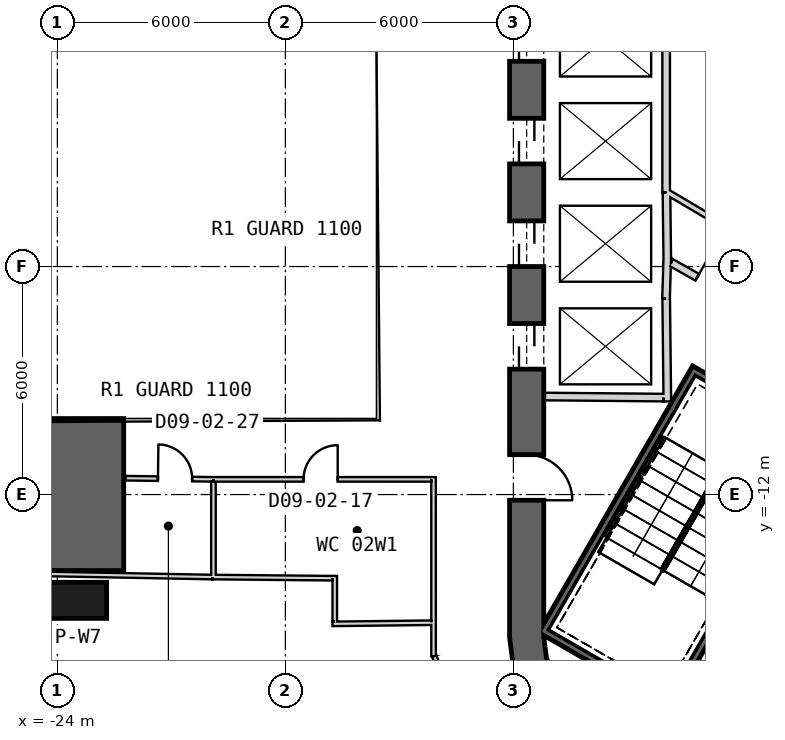
"""IFC4 building model, lengths in metres.
Left out: names, types, materials, properties, quantities, classifications, styles, units other than length and angle.
Written with IfcOpenShell. Run it as: python <this file> out.ifc"""

import sys

from ifc_helpers import new_model, si_unit, direction, frame, frame_2d, origin, origin_2d, place, context, subcontext, project, spatial, polyline, rectangle, outline, extrude, element, fill, save


model = new_model("IFC4")
c1 = context("Model", 3, precision=1e-05, world=origin(), true_north=direction((0.0, 1.0)))
c2 = subcontext(c1, "Body", "Model", "MODEL_VIEW")
j1 = project(units=[si_unit("LENGTHUNIT", "METRE"), si_unit("PLANEANGLEUNIT", "RADIAN")], contexts=[c1])
p1 = place(None, origin())
s1 = spatial("IfcSite", under=j1, at=p1, CompositionType="ELEMENT")
p2 = place(p1, origin())
s2 = spatial("IfcBuilding", under=s1, at=p2, CompositionType="ELEMENT")
p3 = place(p2, frame((0.0, 0.0, 15.5)))
s3 = spatial("IfcBuildingStorey", under=s2, at=p3, CompositionType="ELEMENT", Elevation=15.5)
p4 = place(p3, frame((-23.453, -14.783, 0.0), z_axis=(0.0, 0.0, 1.0), x_axis=(-1.0, 0.0, 0.0)))
e1 = element("IfcColumn", 1, at=p4, inside=s3, PredefinedType="COLUMN", context=c2, shape_type="SweptSolid", body=[
    extrude(rectangle(XDim=1.5, YDim=0.95, at=origin_2d()), origin(), (0.0, 0.0, 1.0), 6.0),
])
p5 = place(p3, frame((-11.65, 15.762, 0.0), z_axis=(0.0, 0.0, 1.0), x_axis=(0.0, -1.0, 0.0)))
e2 = element("IfcWall", 2, at=p5, inside=s3, PredefinedType="SHEAR", context=c2, shape_type="SweptSolid", body=[
    extrude(rectangle(XDim=31.523, YDim=0.9, at=frame_2d((15.762, 0.0))), origin(), (0.0, 0.0, 1.0), 6.0),
])
p6 = place(p5, frame((7.062, 0.0, 0.0)))
e3 = element("IfcOpeningElement", 3, at=p6, cuts=e2, PredefinedType="OPENING", context=c2, shape_type="SweptSolid", body=[
    extrude(rectangle(XDim=1.2, YDim=2.4, at=frame_2d((0.6, 1.2))), frame((0.0, 0.46, 0.0), z_axis=(0.0, -1.0, 0.0), x_axis=(1.0, 0.0, 0.0)), (0.0, 0.0, 1.0), 0.92),
])
p7 = place(p5, frame((9.762, 0.0, 0.0)))
e4 = element("IfcOpeningElement", 4, at=p7, cuts=e2, PredefinedType="OPENING", context=c2, shape_type="SweptSolid", body=[
    extrude(rectangle(XDim=1.2, YDim=2.4, at=frame_2d((0.6, 1.2))), frame((0.0, 0.46, 0.0), z_axis=(0.0, -1.0, 0.0), x_axis=(1.0, 0.0, 0.0)), (0.0, 0.0, 1.0), 0.92),
])
p8 = place(p5, frame((12.462, 0.0, 0.0)))
e5 = element("IfcOpeningElement", 5, at=p8, cuts=e2, PredefinedType="OPENING", context=c2, shape_type="SweptSolid", body=[
    extrude(rectangle(XDim=1.2, YDim=2.4, at=frame_2d((0.6, 1.2))), frame((0.0, 0.46, 0.0), z_axis=(0.0, -1.0, 0.0), x_axis=(1.0, 0.0, 0.0)), (0.0, 0.0, 1.0), 0.92),
])
p9 = place(p5, frame((15.162, 0.0, 0.0)))
e6 = element("IfcOpeningElement", 6, at=p9, cuts=e2, PredefinedType="OPENING", context=c2, shape_type="SweptSolid", body=[
    extrude(rectangle(XDim=1.2, YDim=2.4, at=frame_2d((0.6, 1.2))), frame((0.0, 0.46, 0.0), z_axis=(0.0, -1.0, 0.0), x_axis=(1.0, 0.0, 0.0)), (0.0, 0.0, 1.0), 0.92),
])
p10 = place(p5, frame((17.862, 0.0, 0.0)))
e7 = element("IfcOpeningElement", 7, at=p10, cuts=e2, PredefinedType="OPENING", context=c2, shape_type="SweptSolid", body=[
    extrude(rectangle(XDim=1.2, YDim=2.4, at=frame_2d((0.6, 1.2))), frame((0.0, 0.46, 0.0), z_axis=(0.0, -1.0, 0.0), x_axis=(1.0, 0.0, 0.0)), (0.0, 0.0, 1.0), 0.92),
])
p11 = place(p5, frame((20.562, 0.0, 0.0)))
e8 = element("IfcOpeningElement", 8, at=p11, cuts=e2, PredefinedType="OPENING", context=c2, shape_type="SweptSolid", body=[
    extrude(rectangle(XDim=1.2, YDim=2.4, at=frame_2d((0.6, 1.2))), frame((0.0, 0.46, 0.0), z_axis=(0.0, -1.0, 0.0), x_axis=(1.0, 0.0, 0.0)), (0.0, 0.0, 1.0), 0.92),
])
p12 = place(p5, frame((23.262, 0.0, 0.0)))
e9 = element("IfcOpeningElement", 9, at=p12, cuts=e2, PredefinedType="OPENING", context=c2, shape_type="SweptSolid", body=[
    extrude(rectangle(XDim=1.2, YDim=2.4, at=frame_2d((0.6, 1.2))), frame((0.0, 0.46, 0.0), z_axis=(0.0, -1.0, 0.0), x_axis=(1.0, 0.0, 0.0)), (0.0, 0.0, 1.0), 0.92),
])
p13 = place(p5, frame((3.612, 0.0, 0.0)))
e10 = element("IfcOpeningElement", 10, at=p13, cuts=e2, PredefinedType="OPENING", context=c2, shape_type="SweptSolid", body=[
    extrude(rectangle(XDim=1.2, YDim=2.4, at=frame_2d((0.6, 1.2))), frame((0.0, 0.46, 0.0), z_axis=(0.0, -1.0, 0.0), x_axis=(1.0, 0.0, 0.0)), (0.0, 0.0, 1.0), 0.92),
])
p14 = place(p5, frame((26.712, 0.0, 0.0)))
e11 = element("IfcOpeningElement", 11, at=p14, cuts=e2, PredefinedType="OPENING", context=c2, shape_type="SweptSolid", body=[
    extrude(rectangle(XDim=1.2, YDim=2.4, at=frame_2d((0.6, 1.2))), frame((0.0, 0.46, 0.0), z_axis=(0.0, -1.0, 0.0), x_axis=(1.0, 0.0, 0.0)), (0.0, 0.0, 1.0), 0.92),
])
p15 = place(p3, frame((-7.825, -17.97, 0.0), z_axis=(0.0, 0.0, 1.0), x_axis=(0.866028369851, 0.499994862586, 0.0)))
e12 = element("IfcWall", 12, at=p15, inside=s3, PredefinedType="SHEAR", context=c2, shape_type="SweptSolid", body=[
    extrude(rectangle(XDim=31.523, YDim=0.9, at=frame_2d((15.762, 0.0))), origin(), (0.0, 0.0, 1.0), 6.0),
])
p16 = place(p15, frame((7.062, 0.0, 0.0)))
e13 = element("IfcOpeningElement", 13, at=p16, cuts=e12, PredefinedType="OPENING", context=c2, shape_type="SweptSolid", body=[
    extrude(rectangle(XDim=1.2, YDim=2.4, at=frame_2d((0.6, 1.2))), frame((0.0, 0.46, 0.0), z_axis=(0.0, -1.0, 0.0), x_axis=(1.0, 0.0, 0.0)), (0.0, 0.0, 1.0), 0.92),
])
p17 = place(p15, frame((9.762, 0.0, 0.0)))
e14 = element("IfcOpeningElement", 14, at=p17, cuts=e12, PredefinedType="OPENING", context=c2, shape_type="SweptSolid", body=[
    extrude(rectangle(XDim=1.2, YDim=2.4, at=frame_2d((0.6, 1.2))), frame((0.0, 0.46, 0.0), z_axis=(0.0, -1.0, 0.0), x_axis=(1.0, 0.0, 0.0)), (0.0, 0.0, 1.0), 0.92),
])
p18 = place(p15, frame((12.462, 0.0, 0.0)))
e15 = element("IfcOpeningElement", 15, at=p18, cuts=e12, PredefinedType="OPENING", context=c2, shape_type="SweptSolid", body=[
    extrude(rectangle(XDim=1.2, YDim=2.4, at=frame_2d((0.6, 1.2))), frame((0.0, 0.46, 0.0), z_axis=(0.0, -1.0, 0.0), x_axis=(1.0, 0.0, 0.0)), (0.0, 0.0, 1.0), 0.92),
])
p19 = place(p15, frame((15.162, 0.0, 0.0)))
e16 = element("IfcOpeningElement", 16, at=p19, cuts=e12, PredefinedType="OPENING", context=c2, shape_type="SweptSolid", body=[
    extrude(rectangle(XDim=1.2, YDim=2.4, at=frame_2d((0.6, 1.2))), frame((0.0, 0.46, 0.0), z_axis=(0.0, -1.0, 0.0), x_axis=(1.0, 0.0, 0.0)), (0.0, 0.0, 1.0), 0.92),
])
p20 = place(p15, frame((17.862, 0.0, 0.0)))
e17 = element("IfcOpeningElement", 17, at=p20, cuts=e12, PredefinedType="OPENING", context=c2, shape_type="SweptSolid", body=[
    extrude(rectangle(XDim=1.2, YDim=2.4, at=frame_2d((0.6, 1.2))), frame((0.0, 0.46, 0.0), z_axis=(0.0, -1.0, 0.0), x_axis=(1.0, 0.0, 0.0)), (0.0, 0.0, 1.0), 0.92),
])
p21 = place(p15, frame((20.562, 0.0, 0.0)))
e18 = element("IfcOpeningElement", 18, at=p21, cuts=e12, PredefinedType="OPENING", context=c2, shape_type="SweptSolid", body=[
    extrude(rectangle(XDim=1.2, YDim=2.4, at=frame_2d((0.6, 1.2))), frame((0.0, 0.46, 0.0), z_axis=(0.0, -1.0, 0.0), x_axis=(1.0, 0.0, 0.0)), (0.0, 0.0, 1.0), 0.92),
])
p22 = place(p15, frame((26.712, 0.0, 0.0)))
e19 = element("IfcOpeningElement", 19, at=p22, cuts=e12, PredefinedType="OPENING", context=c2, shape_type="SweptSolid", body=[
    extrude(rectangle(XDim=1.2, YDim=2.4, at=frame_2d((0.6, 1.2))), frame((0.0, 0.46, 0.0), z_axis=(0.0, -1.0, 0.0), x_axis=(1.0, 0.0, 0.0)), (0.0, 0.0, 1.0), 0.92),
])
p23 = place(p15, frame((3.612, 0.0, 0.0)))
e20 = element("IfcOpeningElement", 20, at=p23, cuts=e12, PredefinedType="OPENING", context=c2, shape_type="SweptSolid", body=[
    extrude(rectangle(XDim=1.2, YDim=2.4, at=frame_2d((0.6, 1.2))), frame((0.0, 0.46, 0.0), z_axis=(0.0, -1.0, 0.0), x_axis=(1.0, 0.0, 0.0)), (0.0, 0.0, 1.0), 0.92),
])
p24 = place(p3, origin())
e21 = element("IfcWall", 21, at=p24, inside=s3, PredefinedType="SHEAR", context=c2, shape_type="SweptSolid", body=[
    extrude(outline(polyline([(-12.1, -15.762), (-11.998, -16.538), (-11.698, -17.262), (-11.221, -17.883), (-10.6, -18.36), (-9.876, -18.659), (-9.1, -18.762), (-8.323, -18.659), (-7.6, -18.36), (-8.05, -17.58), (-8.556, -17.79), (-9.1, -17.862), (-9.644, -17.79), (-10.15, -17.58), (-10.585, -17.247), (-10.919, -16.812), (-11.128, -16.305), (-11.2, -15.762), (-12.1, -15.762)])), origin(), (0.0, 0.0, 1.0), 6.0),
])
p25 = place(p3, origin())
e22 = element("IfcWall", 22, at=p25, inside=s3, PredefinedType="SHEAR", context=c2, shape_type="SweptSolid", body=[
    extrude(outline(polyline([(-25.553, -10.0), (-25.553, -14.0), (-22.253, -14.0), (-22.253, -10.0), (-25.553, -10.0)])), origin(), (0.0, 0.0, 1.0), 6.0),
])
p26 = place(p3, frame((-7.98, 4.05, 0.0), z_axis=(0.0, 0.0, 1.0), x_axis=(0.0, -1.0, 0.0)))
e23 = element("IfcWall", 23, at=p26, inside=s3, PredefinedType="PLUMBINGWALL", context=c2, shape_type="SweptSolid", body=[
    extrude(rectangle(XDim=8.1, YDim=0.2, at=frame_2d((4.05, 0.0))), origin(), (0.0, 0.0, 1.0), 5.7),
])
p27 = place(p3, frame((-7.95, -5.772, 0.0), z_axis=(0.0, 0.0, 1.0), x_axis=(-0.030803413295, -0.999525462272, 0.0)))
e24 = element("IfcWall", 24, at=p27, inside=s3, PredefinedType="PLUMBINGWALL", context=c2, shape_type="SweptSolid", body=[
    extrude(rectangle(XDim=1.078, YDim=0.2, at=frame_2d((0.539, 0.0))), origin(), (0.0, 0.0, 1.0), 5.7),
])
p28 = place(p3, frame((-7.971, -4.05, 0.0), z_axis=(0.0, 0.0, 1.0), x_axis=(0.012042535896, -0.999927486035, 0.0)))
e25 = element("IfcWall", 25, at=p28, inside=s3, PredefinedType="PLUMBINGWALL", context=c2, shape_type="SweptSolid", body=[
    extrude(rectangle(XDim=1.845, YDim=0.2, at=frame_2d((0.922, 0.0))), origin(), (0.0, 0.0, 1.0), 5.7),
])
p29 = place(p3, frame((-7.979, -6.85, 0.0), z_axis=(0.0, 0.0, 1.0), x_axis=(0.011121475088, -0.999938154483, 0.0)))
e26 = element("IfcWall", 26, at=p29, inside=s3, PredefinedType="PLUMBINGWALL", context=c2, shape_type="SweptSolid", body=[
    extrude(rectangle(XDim=2.7, YDim=0.2, at=frame_2d((1.35, 0.0))), origin(), (0.0, 0.0, 1.0), 5.7),
])
p30 = place(p3, frame((-8.05, -9.449, 0.0), z_axis=(0.0, 0.0, 1.0), x_axis=(-0.999957467379, 0.009222983926, 0.0)))
e27 = element("IfcWall", 27, at=p30, inside=s3, PredefinedType="PLUMBINGWALL", context=c2, shape_type="SweptSolid", body=[
    extrude(rectangle(XDim=3.15, YDim=0.2, at=frame_2d((1.575, 0.0))), origin(), (0.0, 0.0, 1.0), 5.7),
])
p31 = place(p3, frame((-3.905, -10.563, -0.3), z_axis=(0.0, 0.0, 1.0), x_axis=(-0.500012932018, -0.866017937352, 0.0)))
e28 = element("IfcWall", 28, at=p31, inside=s3, PredefinedType="SHEAR", context=c2, shape_type="SweptSolid", body=[
    extrude(rectangle(XDim=8.1, YDim=0.2, at=frame_2d((4.05, 0.0))), origin(), (0.0, 0.0, 1.0), 6.0),
])
p32 = place(p3, frame((-11.282, -15.541, -0.3), z_axis=(0.0, 0.0, 1.0), x_axis=(0.866000578957, -0.500042995397, 0.0)))
e29 = element("IfcWall", 29, at=p32, inside=s3, PredefinedType="SHEAR", context=c2, shape_type="SweptSolid", body=[
    extrude(rectangle(XDim=1.89, YDim=0.2, at=frame_2d((0.945, 0.0))), origin(), (0.0, 0.0, 1.0), 6.0),
])
p33 = place(p3, frame((-7.196, -8.663, -0.3), z_axis=(0.0, 0.0, 1.0), x_axis=(-0.499997992926, -0.866026562566, 0.0)))
e30 = element("IfcWall", 30, at=p33, inside=s3, PredefinedType="SHEAR", context=c2, shape_type="SweptSolid", body=[
    extrude(rectangle(XDim=7.9, YDim=0.2, at=frame_2d((3.95, 0.0))), origin(), (0.0, 0.0, 1.0), 6.0),
])
p34 = place(p3, frame((-4.041, -10.599, -0.3), z_axis=(0.0, 0.0, 1.0), x_axis=(-0.866047807691, 0.499961193289, 0.0)))
e31 = element("IfcWall", 31, at=p34, inside=s3, PredefinedType="SHEAR", context=c2, shape_type="SweptSolid", body=[
    extrude(rectangle(XDim=3.6, YDim=0.2, at=frame_2d((1.8, 0.0))), origin(), (0.0, 0.0, 1.0), 6.0),
])
p35 = place(p34, frame((1.25, 0.0, 0.3)))
e32 = element("IfcOpeningElement", 32, at=p35, cuts=e31, PredefinedType="OPENING", context=c2, shape_type="SweptSolid", body=[
    extrude(rectangle(XDim=1.1, YDim=2.1, at=frame_2d((0.55, 1.05))), frame((0.0, 0.11, 0.0), z_axis=(0.0, -1.0, 0.0), x_axis=(1.0, 0.0, 0.0)), (0.0, 0.0, 1.0), 0.22),
])
p36 = place(p3, frame((-7.849, -5.894, 0.0), z_axis=(0.0, 0.0, 1.0), x_axis=(0.871363259478, -0.490638431059, 0.0)))
e33 = element("IfcWall", 33, at=p36, inside=s3, PredefinedType="PARTITIONING", context=c2, shape_type="SweptSolid", body=[
    extrude(rectangle(XDim=2.581, YDim=0.2, at=frame_2d((1.291, 0.0))), origin(), (0.0, 0.0, 1.0), 5.7),
])
p37 = place(p36, frame((0.791, 0.0, 0.0)))
e34 = element("IfcOpeningElement", 34, at=p37, cuts=e33, PredefinedType="OPENING", context=c2, shape_type="SweptSolid", body=[
    extrude(rectangle(XDim=1.0, YDim=2.1, at=frame_2d((0.5, 1.05))), frame((0.0, 0.11, 0.0), z_axis=(0.0, -1.0, 0.0), x_axis=(1.0, 0.0, 0.0)), (0.0, 0.0, 1.0), 0.22),
])
p38 = place(p3, frame((-7.95, -4.041, 0.0), z_axis=(0.0, 0.0, 1.0), x_axis=(0.860090281069, -0.510141851263, 0.0)))
e35 = element("IfcWall", 35, at=p38, inside=s3, PredefinedType="PLUMBINGWALL", context=c2, shape_type="SweptSolid", body=[
    extrude(rectangle(XDim=2.089, YDim=0.15, at=frame_2d((1.045, 0.0))), origin(), (0.0, 0.0, 1.0), 5.7),
])
p39 = place(p3, frame((-14.101, -11.54, 0.0), z_axis=(0.0, 0.0, 1.0), x_axis=(0.000155392104, -0.999999987927, 0.0)))
e36 = element("IfcWall", 36, at=p39, inside=s3, PredefinedType="PARTITIONING", context=c2, shape_type="SweptSolid", body=[
    extrude(rectangle(XDim=4.713, YDim=0.12, at=frame_2d((2.357, 0.0))), origin(), (0.0, 0.0, 1.0), 4.88),
])
p40 = place(p3, frame((-19.892, -11.6, 0.0), z_axis=(0.0, 0.0, 1.0), x_axis=(0.999999999093, -4.2596694e-05, 0.0)))
e37 = element("IfcWall", 37, at=p40, inside=s3, PredefinedType="PARTITIONING", context=c2, shape_type="SweptSolid", body=[
    extrude(rectangle(XDim=5.731, YDim=0.12, at=frame_2d((2.866, 0.0))), origin(), (0.0, 0.0, 1.0), 5.17),
])
p41 = place(p40, frame((2.37, 0.0, 0.0)))
e38 = element("IfcOpeningElement", 38, at=p41, cuts=e37, PredefinedType="OPENING", context=c2, shape_type="SweptSolid", body=[
    extrude(rectangle(XDim=0.9, YDim=2.1, at=frame_2d((0.45, 1.05))), frame((0.0, 0.07, 0.0), z_axis=(0.0, -1.0, 0.0), x_axis=(1.0, 0.0, 0.0)), (0.0, 0.0, 1.0), 0.14),
])
p42 = place(p3, frame((-22.203, -11.57, 0.0), z_axis=(0.0, 0.0, 1.0), x_axis=(0.999915590323, -0.012992775999, 0.0)))
e39 = element("IfcWall", 39, at=p42, inside=s3, PredefinedType="PARTITIONING", context=c2, shape_type="SweptSolid", body=[
    extrude(rectangle(XDim=2.311, YDim=0.12, at=frame_2d((1.156, 0.0))), origin(), (0.0, 0.0, 1.0), 5.7),
])
p43 = place(p42, frame((0.851, 0.0, 0.0)))
e40 = element("IfcOpeningElement", 40, at=p43, cuts=e39, PredefinedType="OPENING", context=c2, shape_type="SweptSolid", body=[
    extrude(rectangle(XDim=0.9, YDim=2.1, at=frame_2d((0.45, 1.05))), frame((0.0, 0.07, 0.0), z_axis=(0.0, -1.0, 0.0), x_axis=(1.0, 0.0, 0.0)), (0.0, 0.0, 1.0), 0.14),
])
p44 = place(p3, frame((-14.08, -16.25, 0.0), z_axis=(0.0, 0.0, 1.0), x_axis=(0.34184025858, -0.939758073982, 0.0)))
e41 = element("IfcWall", 41, at=p44, inside=s3, PredefinedType="PARTITIONING", context=c2, shape_type="SweptSolid", body=[
    extrude(rectangle(XDim=2.622, YDim=0.12, at=frame_2d((1.311, 0.0))), origin(), (0.0, 0.0, 1.0), 4.78),
])
p45 = place(p3, frame((-19.892, -11.66, 0.0), z_axis=(0.0, 0.0, 1.0), x_axis=(0.0, -1.0, 0.0)))
e42 = element("IfcWall", 42, at=p45, inside=s3, PredefinedType="PARTITIONING", context=c2, shape_type="SweptSolid", body=[
    extrude(rectangle(XDim=2.541, YDim=0.12, at=frame_2d((1.271, 0.0))), origin(), (0.0, 0.0, 1.0), 5.17),
])
p46 = place(p3, frame((-14.16, -15.372, 0.0), z_axis=(0.0, 0.0, 1.0), x_axis=(-0.999933313555, -0.011548525593, 0.0)))
e43 = element("IfcWall", 43, at=p46, inside=s3, PredefinedType="PARTITIONING", context=c2, shape_type="SweptSolid", body=[
    extrude(rectangle(XDim=2.6, YDim=0.12, at=frame_2d((1.3, 0.0))), origin(), (0.0, 0.0, 1.0), 4.88),
])
p47 = place(p3, frame((-16.7, -15.342, 0.0), z_axis=(0.0, 0.0, 1.0), x_axis=(0.0, 1.0, 0.0)))
e44 = element("IfcWall", 44, at=p47, inside=s3, PredefinedType="PARTITIONING", context=c2, shape_type="SweptSolid", body=[
    extrude(rectangle(XDim=1.2, YDim=0.12, at=frame_2d((0.6, 0.0))), origin(), (0.0, 0.0, 1.0), 5.7),
])
p48 = place(p3, frame((-16.76, -14.201, 0.0), z_axis=(0.0, 0.0, 1.0), x_axis=(-0.999954917278, 0.009495441583, 0.0)))
e45 = element("IfcWall", 45, at=p48, inside=s3, PredefinedType="PARTITIONING", context=c2, shape_type="SweptSolid", body=[
    extrude(rectangle(XDim=3.163, YDim=0.12, at=frame_2d((1.581, 0.0))), origin(), (0.0, 0.0, 1.0), 5.7),
])
p49 = place(p3, frame((-19.922, -14.171, 0.0), z_axis=(0.0, 0.0, 1.0), x_axis=(-0.999824012801, 0.018760155269, 0.0)))
e46 = element("IfcWall", 46, at=p49, inside=s3, PredefinedType="PARTITIONING", context=c2, shape_type="SweptSolid", body=[
    extrude(rectangle(XDim=4.763, YDim=0.12, at=frame_2d((2.381, 0.0))), origin(), (0.0, 0.0, 1.0), 5.17),
])
p50 = place(p37, origin())
e47 = element("IfcDoor", 47, at=p50, inside=s3, OperationType="SINGLE_SWING_LEFT", PredefinedType="USERDEFINED", context=c2, shape_type="SweptSolid", body=[
    extrude(rectangle(XDim=1.0, YDim=2.1, at=frame_2d((0.5, 1.05))), frame((0.0, 0.025, 0.0), z_axis=(0.0, -1.0, 0.0), x_axis=(1.0, 0.0, 0.0)), (0.0, 0.0, 1.0), 0.05),
])
fill(e34, e47)
p51 = place(p41, origin())
e48 = element("IfcDoor", 48, at=p51, inside=s3, OperationType="SINGLE_SWING_RIGHT", PredefinedType="NOTDEFINED", context=c2, shape_type="SweptSolid", body=[
    extrude(rectangle(XDim=0.9, YDim=2.1, at=frame_2d((0.45, 1.05))), frame((0.0, 0.025, 0.0), z_axis=(0.0, -1.0, 0.0), x_axis=(1.0, 0.0, 0.0)), (0.0, 0.0, 1.0), 0.05),
])
fill(e38, e48)
p52 = place(p43, origin())
e49 = element("IfcDoor", 49, at=p52, inside=s3, OperationType="SINGLE_SWING_LEFT", PredefinedType="NOTDEFINED", context=c2, shape_type="SweptSolid", body=[
    extrude(rectangle(XDim=0.9, YDim=2.1, at=frame_2d((0.45, 1.05))), frame((0.0, 0.025, 0.0), z_axis=(0.0, -1.0, 0.0), x_axis=(1.0, 0.0, 0.0)), (0.0, 0.0, 1.0), 0.05),
])
fill(e40, e49)
p53 = place(p9, origin())
e50 = element("IfcDoor", 50, at=p53, inside=s3, OperationType="SLIDING_TO_LEFT", PredefinedType="USERDEFINED", context=c2, shape_type="SweptSolid", body=[
    extrude(rectangle(XDim=1.2, YDim=2.4, at=frame_2d((0.6, 1.2))), frame((0.0, 0.025, 0.0), z_axis=(0.0, -1.0, 0.0), x_axis=(1.0, 0.0, 0.0)), (0.0, 0.0, 1.0), 0.05),
])
fill(e6, e50)
p54 = place(p10, origin())
e51 = element("IfcDoor", 51, at=p54, inside=s3, OperationType="SLIDING_TO_LEFT", PredefinedType="USERDEFINED", context=c2, shape_type="SweptSolid", body=[
    extrude(rectangle(XDim=1.2, YDim=2.4, at=frame_2d((0.6, 1.2))), frame((0.0, 0.025, 0.0), z_axis=(0.0, -1.0, 0.0), x_axis=(1.0, 0.0, 0.0)), (0.0, 0.0, 1.0), 0.05),
])
fill(e7, e51)
p55 = place(p11, origin())
e52 = element("IfcDoor", 52, at=p55, inside=s3, OperationType="SLIDING_TO_LEFT", PredefinedType="USERDEFINED", context=c2, shape_type="SweptSolid", body=[
    extrude(rectangle(XDim=1.2, YDim=2.4, at=frame_2d((0.6, 1.2))), frame((0.0, 0.025, 0.0), z_axis=(0.0, -1.0, 0.0), x_axis=(1.0, 0.0, 0.0)), (0.0, 0.0, 1.0), 0.05),
])
fill(e8, e52)
p56 = place(p12, origin())
e53 = element("IfcDoor", 53, at=p56, inside=s3, OperationType="SLIDING_TO_LEFT", PredefinedType="USERDEFINED", context=c2, shape_type="SweptSolid", body=[
    extrude(rectangle(XDim=1.2, YDim=2.4, at=frame_2d((0.6, 1.2))), frame((0.0, 0.025, 0.0), z_axis=(0.0, -1.0, 0.0), x_axis=(1.0, 0.0, 0.0)), (0.0, 0.0, 1.0), 0.05),
])
fill(e9, e53)
p57 = place(p14, origin())
e54 = element("IfcDoor", 54, at=p57, inside=s3, OperationType="SINGLE_SWING_RIGHT", PredefinedType="USERDEFINED", context=c2, shape_type="SweptSolid", body=[
    extrude(rectangle(XDim=1.2, YDim=2.4, at=frame_2d((0.6, 1.2))), frame((0.0, 0.025, 0.0), z_axis=(0.0, -1.0, 0.0), x_axis=(1.0, 0.0, 0.0)), (0.0, 0.0, 1.0), 0.05),
])
fill(e11, e54)
save(model, sys.argv[1])
